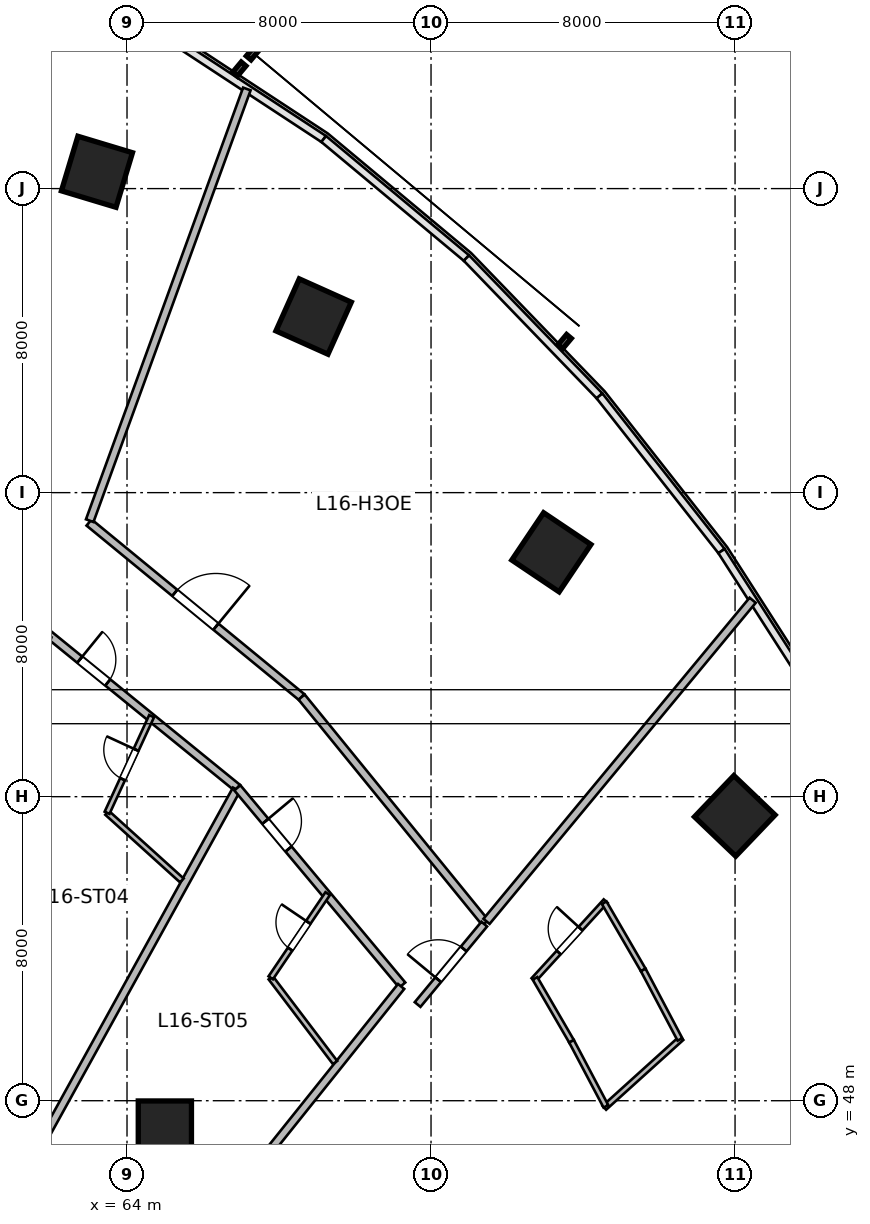
"""IFC4 building model, lengths in metres.
Left out: names, types, materials, properties, quantities, classifications, styles, units other than length and angle.
Written with IfcOpenShell. Run it as: python <this file> out.ifc"""

import sys

from ifc_helpers import new_model, si_unit, direction, frame, frame_2d, origin, origin_2d, place, context, subcontext, project, spatial, rectangle, circle, extrude, source, transform, mapped, element, fill, save


model = new_model("IFC4")
c1 = context("Model", 3, precision=1e-05, world=origin(), true_north=direction((0.0, 1.0)))
c2 = subcontext(c1, "Body", "Model", "MODEL_VIEW")
j1 = project(units=[si_unit("LENGTHUNIT", "METRE"), si_unit("PLANEANGLEUNIT", "RADIAN")], contexts=[c1])
p1 = place(None, origin())
s1 = spatial("IfcSite", under=j1, at=p1, CompositionType="ELEMENT")
p2 = place(p1, origin())
s2 = spatial("IfcBuilding", under=s1, at=p2, CompositionType="ELEMENT")
p3 = place(p2, frame((0.0, 0.0, 71.4)))
s3 = spatial("IfcBuildingStorey", under=s2, at=p3, CompositionType="ELEMENT", Elevation=71.4)
m1 = source(origin(), c2, "Body", "SweptSolid", [
    extrude(rectangle(XDim=1.5, YDim=1.5, at=origin_2d()), origin(), (0.0, 0.0, 1.0), 3.6),
])
for number, where, z_axis, x_axis in (
    (1, (63.209, 72.442, 0.0), (0.0, 0.0, 1.0), (0.289, 0.957, 0.0)),
    (2, (68.91, 68.633, 0.0), (0.0, 0.0, 1.0), (0.409, 0.912, 0.0)),
):
    element("IfcColumn", number, at=place(p3, frame(where, z_axis=z_axis, x_axis=x_axis)), inside=s3, PredefinedType="COLUMN", context=c2, shape_type="MappedRepresentation", body=[
        mapped(m1, transform((0.0, 0.0, 0.0), scale=1.0)),
    ])
m2 = source(origin(), c2, "Body", "SweptSolid", [
    extrude(circle(Radius=0.7, at=origin_2d()), origin(), (0.0, 0.0, 1.0), 3.6),
])
p4 = place(p3, frame((64.996, 47.294, 0.0), z_axis=(0.0, 0.0, 1.0), x_axis=(0.55774510898, 0.830012285095, 0.0)))
e3 = element("IfcColumn", 3, at=p4, inside=s3, PredefinedType="COLUMN", context=c2, shape_type="MappedRepresentation", body=[
    mapped(m2, transform((0.0, 0.0, 0.0), scale=1.0)),
])
for number, where, z_axis, x_axis in (
    (4, (75.167, 62.43, 0.0), (0.0, 0.0, 1.0), (0.558, 0.83, 0.0)),
    (5, (79.993, 55.494, 0.0), (0.0, 0.0, 1.0), (0.691, 0.723, 0.0)),
):
    element("IfcColumn", number, at=place(p3, frame(where, z_axis=z_axis, x_axis=x_axis)), inside=s3, PredefinedType="COLUMN", context=c2, shape_type="MappedRepresentation", body=[
        mapped(m1, transform((0.0, 0.0, 0.0), scale=1.0)),
    ])
m3 = source(origin(), c2, "Body", "SweptSolid", [
    extrude(rectangle(XDim=7.237, YDim=0.21, at=frame_2d((3.618, 0.0))), origin(), (0.0, 0.0, 1.0), 3.36),
])
p5 = place(p3, frame((63.001, 63.214, 0.0), z_axis=(0.0, 0.0, 1.0), x_axis=(0.772813707793, -0.634632943557, 0.0)))
e6 = element("IfcWall", 6, at=p5, inside=s3, PredefinedType="PARTITIONING", context=c2, shape_type="MappedRepresentation", body=[
    mapped(m3, transform((0.0, 0.0, 0.0), scale=1.0)),
])
p6 = place(p5, frame((2.918, 0.0, 0.0)))
e7 = element("IfcOpeningElement", 7, at=p6, cuts=e6, PredefinedType="OPENING", context=c2, shape_type="SweptSolid", body=[
    extrude(rectangle(XDim=1.4, YDim=2.15, at=frame_2d((0.7, 1.075))), frame((0.0, 0.115, 0.0), z_axis=(0.0, -1.0, 0.0), x_axis=(1.0, 0.0, 0.0)), (0.0, 0.0, 1.0), 0.23),
])
m4 = source(origin(), c2, "Body", "SweptSolid", [
    extrude(rectangle(XDim=7.659, YDim=0.21, at=frame_2d((3.829, 0.0))), origin(), (0.0, 0.0, 1.0), 3.36),
])
p7 = place(p3, frame((68.594, 58.621, 0.0), z_axis=(0.0, 0.0, 1.0), x_axis=(0.631489868862, -0.775384127723, 0.0)))
e8 = element("IfcWall", 8, at=p7, inside=s3, PredefinedType="PARTITIONING", context=c2, shape_type="MappedRepresentation", body=[
    mapped(m4, transform((0.0, 0.0, 0.0), scale=1.0)),
])
m5 = source(origin(), c2, "Body", "SweptSolid", [
    extrude(rectangle(XDim=12.088, YDim=0.21, at=frame_2d((6.044, 0.0))), origin(), (0.0, 0.0, 1.0), 3.36),
])
p8 = place(p3, frame((63.019, 63.262, 0.0), z_axis=(0.0, 0.0, 1.0), x_axis=(0.34203007529, 0.939689005787, 0.0)))
e9 = element("IfcWall", 9, at=p8, inside=s3, PredefinedType="PARTITIONING", context=c2, shape_type="MappedRepresentation", body=[
    mapped(m5, transform((0.0, 0.0, 0.0), scale=1.0)),
])
m6 = source(origin(), c2, "Body", "SweptSolid", [
    extrude(rectangle(XDim=10.975, YDim=0.21, at=frame_2d((5.487, 0.0))), origin(), (0.0, 0.0, 1.0), 3.36),
])
p9 = place(p3, frame((73.46, 52.719, 0.0), z_axis=(0.0, 0.0, 1.0), x_axis=(0.638125265812, 0.769932558821, 0.0)))
e10 = element("IfcWall", 10, at=p9, inside=s3, PredefinedType="PARTITIONING", context=c2, shape_type="MappedRepresentation", body=[
    mapped(m6, transform((0.0, 0.0, 0.0), scale=1.0)),
])
m7 = source(origin(), c2, "Body", "SweptSolid", [
    extrude(rectangle(XDim=6.408, YDim=0.21, at=frame_2d((3.204, 0.0))), origin(), (0.0, 0.0, 1.0), 3.36),
])
p10 = place(p3, frame((61.931, 60.275, 0.0), z_axis=(0.0, 0.0, 1.0), x_axis=(0.775878552904, -0.630882295792, 0.0)))
e11 = element("IfcWall", 11, at=p10, inside=s3, PredefinedType="PARTITIONING", context=c2, shape_type="MappedRepresentation", body=[
    mapped(m7, transform((0.0, 0.0, 0.0), scale=1.0)),
])
p11 = place(p10, frame((1.063, 0.0, 0.0)))
e12 = element("IfcOpeningElement", 12, at=p11, cuts=e11, PredefinedType="OPENING", context=c2, shape_type="SweptSolid", body=[
    extrude(rectangle(XDim=0.95, YDim=2.15, at=frame_2d((0.475, 1.075))), frame((0.0, 0.115, 0.0), z_axis=(0.0, -1.0, 0.0), x_axis=(1.0, 0.0, 0.0)), (0.0, 0.0, 1.0), 0.23),
])
m8 = source(origin(), c2, "Body", "SweptSolid", [
    extrude(rectangle(XDim=11.692, YDim=0.21, at=frame_2d((5.846, 0.0))), origin(), (0.0, 0.0, 1.0), 2.99),
])
p12 = place(p3, frame((61.228, 45.954, 0.0), z_axis=(0.0, 0.0, 1.0), x_axis=(0.483398579324, 0.875400373262, 0.0)))
e13 = element("IfcWall", 13, at=p12, inside=s3, PredefinedType="PARTITIONING", context=c2, shape_type="MappedRepresentation", body=[
    mapped(m8, transform((0.0, 0.0, 0.0), scale=1.0)),
])
m9 = source(origin(), c2, "Body", "SweptSolid", [
    extrude(rectangle(XDim=2.653, YDim=0.14, at=frame_2d((1.327, 0.0))), origin(), (0.0, 0.0, 1.0), 3.36),
])
p13 = place(p3, frame((63.475, 55.576, 0.0), z_axis=(0.0, 0.0, 1.0), x_axis=(0.741731938744, -0.67069645224, 0.0)))
e14 = element("IfcWall", 14, at=p13, inside=s3, PredefinedType="PARTITIONING", context=c2, shape_type="MappedRepresentation", body=[
    mapped(m9, transform((0.0, 0.0, 0.0), scale=1.0)),
])
m10 = source(origin(), c2, "Body", "SweptSolid", [
    extrude(rectangle(XDim=2.799, YDim=0.14, at=frame_2d((1.4, 0.0))), origin(), (0.0, 0.0, 1.0), 3.36),
])
p14 = place(p3, frame((63.475, 55.576, 0.0), z_axis=(0.0, 0.0, 1.0), x_axis=(0.418626740412, 0.908158384981, 0.0)))
e15 = element("IfcWall", 15, at=p14, inside=s3, PredefinedType="PARTITIONING", context=c2, shape_type="MappedRepresentation", body=[
    mapped(m10, transform((0.0, 0.0, 0.0), scale=1.0)),
])
p15 = place(p14, frame((0.975, 0.0, 0.0)))
e16 = element("IfcOpeningElement", 16, at=p15, cuts=e15, PredefinedType="OPENING", context=c2, shape_type="SweptSolid", body=[
    extrude(rectangle(XDim=0.85, YDim=2.05, at=frame_2d((0.425, 1.025))), frame((0.0, 0.08, 0.0), z_axis=(0.0, -1.0, 0.0), x_axis=(1.0, 0.0, 0.0)), (0.0, 0.0, 1.0), 0.16),
])
m11 = source(origin(), c2, "Body", "SweptSolid", [
    extrude(rectangle(XDim=6.764, YDim=0.21, at=frame_2d((3.382, 0.0))), origin(), (0.0, 0.0, 1.0), 3.36),
])
p16 = place(p3, frame((66.904, 56.232, 0.0), z_axis=(0.0, 0.0, 1.0), x_axis=(0.641433176235, -0.767178910311, 0.0)))
e17 = element("IfcWall", 17, at=p16, inside=s3, PredefinedType="PARTITIONING", context=c2, shape_type="MappedRepresentation", body=[
    mapped(m11, transform((0.0, 0.0, 0.0), scale=1.0)),
])
p17 = place(p16, frame((1.148, 0.0, 0.0)))
e18 = element("IfcOpeningElement", 18, at=p17, cuts=e17, PredefinedType="OPENING", context=c2, shape_type="SweptSolid", body=[
    extrude(rectangle(XDim=0.95, YDim=2.15, at=frame_2d((0.475, 1.075))), frame((0.0, 0.115, 0.0), z_axis=(0.0, -1.0, 0.0), x_axis=(1.0, 0.0, 0.0)), (0.0, 0.0, 1.0), 0.23),
])
m12 = source(origin(), c2, "Body", "SweptSolid", [
    extrude(rectangle(XDim=11.095, YDim=0.21, at=frame_2d((5.548, 0.0))), origin(), (0.0, 0.0, 1.0), 2.99),
])
p18 = place(p3, frame((64.281, 42.344, 0.0), z_axis=(0.0, 0.0, 1.0), x_axis=(0.6248131083, 0.780774346208, 0.0)))
e19 = element("IfcWall", 19, at=p18, inside=s3, PredefinedType="PARTITIONING", context=c2, shape_type="MappedRepresentation", body=[
    mapped(m12, transform((0.0, 0.0, 0.0), scale=1.0)),
])
m13 = source(origin(), c2, "Body", "SweptSolid", [
    extrude(rectangle(XDim=2.8, YDim=0.14, at=frame_2d((1.4, 0.0))), origin(), (0.0, 0.0, 1.0), 3.36),
])
p19 = place(p3, frame((67.782, 51.234, 0.0), z_axis=(0.0, 0.0, 1.0), x_axis=(0.604607833789, -0.796523299923, 0.0)))
e20 = element("IfcWall", 20, at=p19, inside=s3, PredefinedType="PARTITIONING", context=c2, shape_type="MappedRepresentation", body=[
    mapped(m13, transform((0.0, 0.0, 0.0), scale=1.0)),
])
m14 = source(origin(), c2, "Body", "SweptSolid", [
    extrude(rectangle(XDim=2.673, YDim=0.14, at=frame_2d((1.336, 0.0))), origin(), (0.0, 0.0, 1.0), 2.644),
])
p20 = place(p3, frame((67.782, 51.234, 0.0), z_axis=(0.0, 0.0, 1.0), x_axis=(0.560399679065, 0.828222312972, 0.0)))
e21 = element("IfcWall", 21, at=p20, inside=s3, PredefinedType="PARTITIONING", context=c2, shape_type="MappedRepresentation", body=[
    mapped(m14, transform((0.0, 0.0, 0.0), scale=1.0)),
])
p21 = place(p20, frame((0.911, 0.0, 0.0)))
e22 = element("IfcOpeningElement", 22, at=p21, cuts=e21, PredefinedType="OPENING", context=c2, shape_type="SweptSolid", body=[
    extrude(rectangle(XDim=0.85, YDim=2.05, at=frame_2d((0.425, 1.025))), frame((0.0, 0.08, 0.0), z_axis=(0.0, -1.0, 0.0), x_axis=(1.0, 0.0, 0.0)), (0.0, 0.0, 1.0), 0.16),
])
m15 = source(origin(), c2, "Body", "SweptSolid", [
    extrude(rectangle(XDim=2.748, YDim=0.195, at=frame_2d((1.374, 0.0))), origin(), (0.0, 0.0, 1.0), 3.36),
])
p22 = place(p3, frame((71.647, 50.531, 0.0), z_axis=(0.0, 0.0, 1.0), x_axis=(0.638111168284, 0.769944242729, 0.0)))
e23 = element("IfcWall", 23, at=p22, inside=s3, PredefinedType="PARTITIONING", context=c2, shape_type="MappedRepresentation", body=[
    mapped(m15, transform((0.0, 0.0, 0.0), scale=1.0)),
])
p23 = place(p22, frame((0.849, 0.0, 0.0)))
e24 = element("IfcOpeningElement", 24, at=p23, cuts=e23, PredefinedType="OPENING", context=c2, shape_type="SweptSolid", body=[
    extrude(rectangle(XDim=1.05, YDim=2.15, at=frame_2d((0.525, 1.075))), frame((0.0, 0.107, 0.0), z_axis=(0.0, -1.0, 0.0), x_axis=(1.0, 0.0, 0.0)), (0.0, 0.0, 1.0), 0.215),
])
m16 = source(origin(), c2, "Body", "SweptSolid", [
    extrude(rectangle(XDim=2.812, YDim=0.14, at=frame_2d((1.406, 0.0))), origin(), (0.0, 0.0, 1.0), 3.36),
])
p24 = place(p3, frame((74.697, 51.177, 0.0), z_axis=(0.0, 0.0, 1.0), x_axis=(0.675119025852, 0.737708818527, 0.0)))
e25 = element("IfcWall", 25, at=p24, inside=s3, PredefinedType="PARTITIONING", context=c2, shape_type="MappedRepresentation", body=[
    mapped(m16, transform((0.0, 0.0, 0.0), scale=1.0)),
])
p25 = place(p24, frame((0.981, 0.0, 0.0)))
e26 = element("IfcOpeningElement", 26, at=p25, cuts=e25, PredefinedType="OPENING", context=c2, shape_type="SweptSolid", body=[
    extrude(rectangle(XDim=0.85, YDim=2.05, at=frame_2d((0.425, 1.025))), frame((0.0, 0.08, 0.0), z_axis=(0.0, -1.0, 0.0), x_axis=(1.0, 0.0, 0.0)), (0.0, 0.0, 1.0), 0.16),
])
m17 = source(origin(), c2, "Body", "SweptSolid", [
    extrude(rectangle(XDim=2.738, YDim=0.14, at=frame_2d((1.369, 0.0))), origin(), (0.0, 0.0, 1.0), 3.36),
])
p26 = place(p3, frame((76.56, 47.814, 0.0), z_axis=(0.0, 0.0, 1.0), x_axis=(0.741873676582, 0.670539669218, 0.0)))
e27 = element("IfcWall", 27, at=p26, inside=s3, PredefinedType="PARTITIONING", context=c2, shape_type="MappedRepresentation", body=[
    mapped(m17, transform((0.0, 0.0, 0.0), scale=1.0)),
])
m18 = source(origin(), c2, "Body", "SweptSolid", [
    extrude(rectangle(XDim=1.914, YDim=0.14, at=frame_2d((0.957, 0.0))), origin(), (0.0, 0.0, 1.0), 3.36),
])
p27 = place(p3, frame((74.736, 51.219, 0.0), z_axis=(0.0, 0.0, 1.0), x_axis=(0.502347790612, -0.864665656347, 0.0)))
e28 = element("IfcWall", 28, at=p27, inside=s3, PredefinedType="PARTITIONING", context=c2, shape_type="MappedRepresentation", body=[
    mapped(m18, transform((0.0, 0.0, 0.0), scale=1.0)),
])
m19 = source(origin(), c2, "Body", "SweptSolid", [
    extrude(rectangle(XDim=2.045, YDim=0.14, at=frame_2d((1.022, 0.0))), origin(), (0.0, 0.0, 1.0), 3.36),
])
p28 = place(p3, frame((76.557, 53.209, 0.0), z_axis=(0.0, 0.0, 1.0), x_axis=(0.5023112139, -0.864686905411, 0.0)))
e29 = element("IfcWall", 29, at=p28, inside=s3, PredefinedType="PARTITIONING", context=c2, shape_type="MappedRepresentation", body=[
    mapped(m19, transform((0.0, 0.0, 0.0), scale=1.0)),
])
m20 = source(origin(), c2, "Body", "SweptSolid", [
    extrude(rectangle(XDim=1.936, YDim=0.14, at=frame_2d((0.968, 0.0))), origin(), (0.0, 0.0, 1.0), 3.36),
])
p29 = place(p3, frame((75.697, 49.563, 0.0), z_axis=(0.0, 0.0, 1.0), x_axis=(0.467174971862, -0.884164886017, 0.0)))
e30 = element("IfcWall", 30, at=p29, inside=s3, PredefinedType="PARTITIONING", context=c2, shape_type="MappedRepresentation", body=[
    mapped(m20, transform((0.0, 0.0, 0.0), scale=1.0)),
])
m21 = source(origin(), c2, "Body", "SweptSolid", [
    extrude(rectangle(XDim=2.068, YDim=0.14, at=frame_2d((1.034, 0.0))), origin(), (0.0, 0.0, 1.0), 3.36),
])
p30 = place(p3, frame((77.584, 51.441, 0.0), z_axis=(0.0, 0.0, 1.0), x_axis=(0.467215057643, -0.884143704333, 0.0)))
e31 = element("IfcWall", 31, at=p30, inside=s3, PredefinedType="PARTITIONING", context=c2, shape_type="MappedRepresentation", body=[
    mapped(m21, transform((0.0, 0.0, 0.0), scale=1.0)),
])
m22 = source(origin(), c2, "Body", "SweptSolid", [
    extrude(rectangle(XDim=1.4, YDim=2.15, at=frame_2d((0.7, 1.075))), frame((0.0, 0.025, 0.0), z_axis=(0.0, -1.0, 0.0), x_axis=(1.0, 0.0, 0.0)), (0.0, 0.0, 1.0), 0.05),
])
p31 = place(p6, origin())
e32 = element("IfcDoor", 32, at=p31, inside=s3, OperationType="SINGLE_SWING_RIGHT", PredefinedType="DOOR", context=c2, shape_type="MappedRepresentation", body=[
    mapped(m22, transform((0.0, 0.0, 0.0), scale=1.0)),
])
fill(e7, e32)
m23 = source(origin(), c2, "Body", "SweptSolid", [
    extrude(rectangle(XDim=0.95, YDim=2.15, at=frame_2d((0.475, 1.075))), frame((0.0, 0.025, 0.0), z_axis=(0.0, -1.0, 0.0), x_axis=(1.0, 0.0, 0.0)), (0.0, 0.0, 1.0), 0.05),
])
p32 = place(p11, origin())
e33 = element("IfcDoor", 33, at=p32, inside=s3, OperationType="SINGLE_SWING_LEFT", PredefinedType="DOOR", context=c2, shape_type="MappedRepresentation", body=[
    mapped(m23, transform((0.0, 0.0, 0.0), scale=1.0)),
])
fill(e12, e33)
m24 = source(origin(), c2, "Body", "SweptSolid", [
    extrude(rectangle(XDim=0.85, YDim=2.05, at=frame_2d((0.425, 1.025))), frame((0.0, 0.025, 0.0), z_axis=(0.0, -1.0, 0.0), x_axis=(1.0, 0.0, 0.0)), (0.0, 0.0, 1.0), 0.05),
])
p33 = place(p15, origin())
e34 = element("IfcDoor", 34, at=p33, inside=s3, OperationType="SINGLE_SWING_RIGHT", PredefinedType="DOOR", context=c2, shape_type="MappedRepresentation", body=[
    mapped(m24, transform((0.0, 0.0, 0.0), scale=1.0)),
])
fill(e16, e34)
p34 = place(p17, origin())
e35 = element("IfcDoor", 35, at=p34, inside=s3, OperationType="SINGLE_SWING_LEFT", PredefinedType="DOOR", context=c2, shape_type="MappedRepresentation", body=[
    mapped(m23, transform((0.0, 0.0, 0.0), scale=1.0)),
])
fill(e18, e35)
p35 = place(p21, origin())
e36 = element("IfcDoor", 36, at=p35, inside=s3, OperationType="SINGLE_SWING_RIGHT", PredefinedType="DOOR", context=c2, shape_type="MappedRepresentation", body=[
    mapped(m24, transform((0.0, 0.0, 0.0), scale=1.0)),
])
fill(e22, e36)
m25 = source(origin(), c2, "Body", "SweptSolid", [
    extrude(rectangle(XDim=1.05, YDim=2.15, at=frame_2d((0.525, 1.075))), frame((0.0, 0.025, 0.0), z_axis=(0.0, -1.0, 0.0), x_axis=(1.0, 0.0, 0.0)), (0.0, 0.0, 1.0), 0.05),
])
p36 = place(p23, origin())
e37 = element("IfcDoor", 37, at=p36, inside=s3, OperationType="SINGLE_SWING_LEFT", PredefinedType="DOOR", context=c2, shape_type="MappedRepresentation", body=[
    mapped(m25, transform((0.0, 0.0, 0.0), scale=1.0)),
])
fill(e24, e37)
p37 = place(p25, origin())
e38 = element("IfcDoor", 38, at=p37, inside=s3, OperationType="SINGLE_SWING_RIGHT", PredefinedType="DOOR", context=c2, shape_type="MappedRepresentation", body=[
    mapped(m24, transform((0.0, 0.0, 0.0), scale=1.0)),
])
fill(e26, e38)
save(model, sys.argv[1])
